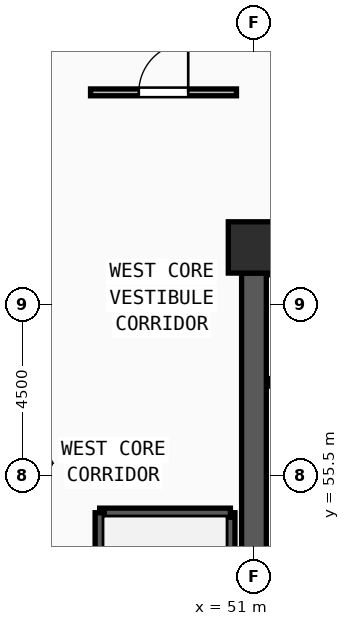
"""IFC4 building model, lengths in metres.
Left out: names, types, materials, properties, quantities, classifications, styles, units other than length and angle.
Written with IfcOpenShell. Run it as: python <this file> out.ifc"""

import sys

from ifc_helpers import new_model, si_unit, direction, frame, frame_2d, origin, origin_2d, place, context, subcontext, project, spatial, rectangle, extrude, source, transform, mapped, element, fill, save


model = new_model("IFC4")
c1 = context("Model", 3, precision=1e-05, world=origin(), true_north=direction((0.0, 1.0)))
c2 = subcontext(c1, "Body", "Model", "MODEL_VIEW")
j1 = project(units=[si_unit("LENGTHUNIT", "METRE"), si_unit("PLANEANGLEUNIT", "RADIAN")], contexts=[c1])
p1 = place(None, origin())
s1 = spatial("IfcSite", under=j1, at=p1, CompositionType="ELEMENT")
p2 = place(p1, origin())
s2 = spatial("IfcBuilding", under=s1, at=p2, CompositionType="ELEMENT")
p3 = place(p2, frame((0.0, 0.0, 258.75)))
s3 = spatial("IfcBuildingStorey", under=s2, at=p3, CompositionType="ELEMENT", Elevation=258.75)
m1 = source(origin(), c2, "Body", "SweptSolid", [
    extrude(rectangle(XDim=1.35, YDim=1.35, at=origin_2d()), origin(), (0.0, 0.0, 1.0), 3.75),
])
p4 = place(p3, frame((51.0, 61.5, 0.0), z_axis=(0.0, 0.0, 1.0), x_axis=(1.0, 0.0, 0.0)))
e1 = element("IfcColumn", 1, at=p4, inside=s3, PredefinedType="COLUMN", context=c2, shape_type="MappedRepresentation", body=[
    mapped(m1, transform((0.0, 0.0, 0.0), x_axis=(1.0, 0.0, 0.0), y_axis=(0.0, 1.0, 0.0), z_axis=(0.0, 0.0, 1.0), scale=1.0)),
])
p5 = place(p3, frame((51.0, 47.175, 0.0), z_axis=(0.0, 0.0, 1.0), x_axis=(0.0, 1.0, 0.0)))
e2 = element("IfcWall", 2, at=p5, inside=s3, PredefinedType="SHEAR", context=c2, shape_type="SweptSolid", body=[
    extrude(rectangle(XDim=13.65, YDim=0.65, at=frame_2d((6.825, 0.0))), origin(), (0.0, 0.0, 1.0), 3.57),
])
p6 = place(p3, frame((50.38, 46.7, 0.0), z_axis=(0.0, 0.0, 1.0), x_axis=(0.0, 1.0, 0.0)))
e3 = element("IfcWall", 3, at=p6, inside=s3, PredefinedType="SOLIDWALL", context=c2, shape_type="SweptSolid", body=[
    extrude(rectangle(XDim=7.82, YDim=0.24, at=frame_2d((3.91, 0.0))), origin(), (0.0, 0.0, 1.0), 3.57),
])
p7 = place(p3, frame((50.38, 54.52, 0.0), z_axis=(0.0, 0.0, 1.0), x_axis=(-1.0, 0.0, 0.0)))
e4 = element("IfcWall", 4, at=p7, inside=s3, PredefinedType="SOLIDWALL", context=c2, shape_type="SweptSolid", body=[
    extrude(rectangle(XDim=3.44, YDim=0.24, at=frame_2d((1.72, 0.0))), origin(), (0.0, 0.0, 1.0), 3.57),
])
p8 = place(p3, frame((46.94, 54.52, 0.0), z_axis=(0.0, 0.0, 1.0), x_axis=(0.0, -1.0, 0.0)))
e5 = element("IfcWall", 5, at=p8, inside=s3, PredefinedType="SOLIDWALL", context=c2, shape_type="SweptSolid", body=[
    extrude(rectangle(XDim=7.82, YDim=0.24, at=frame_2d((3.91, 0.0))), origin(), (0.0, 0.0, 1.0), 3.57),
])
m2 = source(origin(), c2, "Body", "SweptSolid", [
    extrude(rectangle(XDim=1.2, YDim=2.2, at=frame_2d((0.6, 1.1))), frame((0.0, 0.13, 0.0), z_axis=(0.0, -1.0, 0.0), x_axis=(1.0, 0.0, 0.0)), (0.0, 0.0, 1.0), 0.26),
])
p9 = place(p8, frame((6.3, 0.0, 0.0)))
e6 = element("IfcOpeningElement", 6, at=p9, cuts=e5, PredefinedType="OPENING", context=c2, shape_type="MappedRepresentation", body=[
    mapped(m2, transform((0.0, 0.0, 0.0), x_axis=(1.0, 0.0, 0.0), y_axis=(0.0, 1.0, 0.0), z_axis=(0.0, 0.0, 1.0), scale=1.0)),
])
for number, where, z_axis, x_axis in (
    (7, (51.4, 57.95, 0.0), (0.0, 0.0, 1.0), (1.0, 0.0, 0.0)),
    (8, (53.8, 60.88, 0.0), (0.0, 0.0, 1.0), (-1.0, 0.0, 0.0)),
):
    element("IfcWall", number, at=place(p3, frame(where, z_axis=z_axis, x_axis=x_axis)), inside=s3, PredefinedType="SOLIDWALL", context=c2, shape_type="SweptSolid", body=[
        extrude(rectangle(XDim=2.4, YDim=0.2, at=frame_2d((1.2, 0.0))), origin(), (0.0, 0.0, 1.0), 3.57),
    ])
p10 = place(p3, frame((46.7, 65.58, 0.0), z_axis=(0.0, 0.0, 1.0), x_axis=(1.0, 0.0, 0.0)))
e9 = element("IfcWall", 9, at=p10, inside=s3, PredefinedType="PARTITIONING", context=c2, shape_type="SweptSolid", body=[
    extrude(rectangle(XDim=3.84, YDim=0.18, at=frame_2d((1.92, 0.0))), origin(), (0.0, 0.0, 1.0), 3.57),
])
m3 = source(origin(), c2, "Body", "SweptSolid", [
    extrude(rectangle(XDim=1.3, YDim=2.2, at=frame_2d((0.65, 1.1))), frame((0.0, 0.1, 0.0), z_axis=(0.0, -1.0, 0.0), x_axis=(1.0, 0.0, 0.0)), (0.0, 0.0, 1.0), 0.2),
])
p11 = place(p10, frame((1.27, 0.0, 0.0)))
e10 = element("IfcOpeningElement", 10, at=p11, cuts=e9, PredefinedType="OPENING", context=c2, shape_type="MappedRepresentation", body=[
    mapped(m3, transform((0.0, 0.0, 0.0), x_axis=(1.0, 0.0, 0.0), y_axis=(0.0, 1.0, 0.0), z_axis=(0.0, 0.0, 1.0), scale=1.0)),
])
m4 = source(origin(), c2, "Body", "SweptSolid", [
    extrude(rectangle(XDim=1.3, YDim=2.2, at=frame_2d((0.65, 1.1))), frame((0.0, 0.025, 0.0), z_axis=(0.0, -1.0, 0.0), x_axis=(1.0, 0.0, 0.0)), (0.0, 0.0, 1.0), 0.05),
])
p12 = place(p11, origin())
e11 = element("IfcDoor", 11, at=p12, inside=s3, OperationType="SINGLE_SWING_RIGHT", PredefinedType="DOOR", context=c2, shape_type="MappedRepresentation", body=[
    mapped(m4, transform((0.0, 0.0, 0.0), x_axis=(1.0, 0.0, 0.0), y_axis=(0.0, 1.0, 0.0), z_axis=(0.0, 0.0, 1.0), scale=1.0)),
])
fill(e10, e11)
save(model, sys.argv[1])
